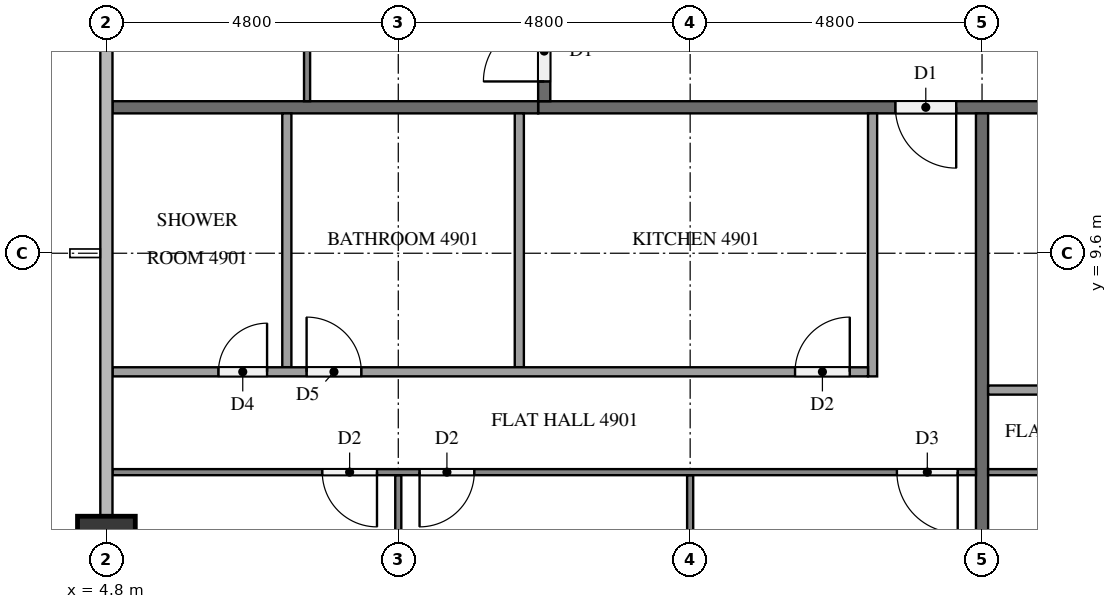
"""IFC4 building model, lengths in metres.
Left out: names, types, materials, properties, quantities, classifications, styles, units other than length and angle.
Written with IfcOpenShell. Run it as: python <this file> out.ifc"""

import sys

from ifc_helpers import new_model, si_unit, direction, frame, frame_2d, origin, origin_2d, place, context, subcontext, project, spatial, rectangle, extrude, element, fill, save


model = new_model("IFC4")
c1 = context("Model", 3, precision=1e-05, world=origin(), true_north=direction((0.0, 1.0)))
c2 = subcontext(c1, "Body", "Model", "MODEL_VIEW")
j1 = project(units=[si_unit("LENGTHUNIT", "METRE"), si_unit("PLANEANGLEUNIT", "RADIAN")], contexts=[c1])
p1 = place(None, origin())
s1 = spatial("IfcSite", under=j1, at=p1, CompositionType="ELEMENT")
p2 = place(p1, origin())
s2 = spatial("IfcBuilding", under=s1, at=p2, CompositionType="ELEMENT")
p3 = place(p2, frame((0.0, 0.0, 189.4)))
s3 = spatial("IfcBuildingStorey", under=s2, at=p3, CompositionType="ELEMENT", Elevation=189.4)
p4 = place(p3, frame((4.8, 4.8, 0.0), z_axis=(0.0, 0.0, 1.0), x_axis=(1.0, 0.0, 0.0)))
e1 = element("IfcColumn", 1, at=p4, inside=s3, PredefinedType="COLUMN", context=c2, shape_type="SweptSolid", body=[
    extrude(rectangle(XDim=0.95, YDim=0.95, at=origin_2d()), origin(), (0.0, 0.0, 1.0), 3.2),
])
p5 = place(p3, frame((50.5, 12.0, 0.0), z_axis=(0.0, 0.0, 1.0), x_axis=(-1.0, 0.0, 0.0)))
e2 = element("IfcWall", 2, at=p5, inside=s3, PredefinedType="PARTITIONING", context=c2, shape_type="SweptSolid", body=[
    extrude(rectangle(XDim=38.6, YDim=0.2, at=frame_2d((19.3, 0.0))), origin(), (0.0, 0.0, 1.0), 3.2),
])
p6 = place(p5, frame((31.725, 0.0, 0.0)))
e3 = element("IfcOpeningElement", 3, at=p6, cuts=e2, PredefinedType="OPENING", context=c2, shape_type="SweptSolid", body=[
    extrude(rectangle(XDim=1.0, YDim=2.1, at=frame_2d((0.5, 1.05))), frame((0.0, 0.11, 0.0), z_axis=(0.0, -1.0, 0.0), x_axis=(1.0, 0.0, 0.0)), (0.0, 0.0, 1.0), 0.22),
])
p7 = place(p5, frame((19.725, 0.0, 0.0)))
e4 = element("IfcOpeningElement", 4, at=p7, cuts=e2, PredefinedType="OPENING", context=c2, shape_type="SweptSolid", body=[
    extrude(rectangle(XDim=1.0, YDim=2.1, at=frame_2d((0.5, 1.05))), frame((0.0, 0.11, 0.0), z_axis=(0.0, -1.0, 0.0), x_axis=(1.0, 0.0, 0.0)), (0.0, 0.0, 1.0), 0.22),
])
p8 = place(p5, frame((17.875, 0.0, 0.0)))
e5 = element("IfcOpeningElement", 5, at=p8, cuts=e2, PredefinedType="OPENING", context=c2, shape_type="SweptSolid", body=[
    extrude(rectangle(XDim=1.0, YDim=2.1, at=frame_2d((0.5, 1.05))), frame((0.0, 0.11, 0.0), z_axis=(0.0, -1.0, 0.0), x_axis=(1.0, 0.0, 0.0)), (0.0, 0.0, 1.0), 0.22),
])
p9 = place(p5, frame((3.475, 0.0, 0.0)))
e6 = element("IfcOpeningElement", 6, at=p9, cuts=e2, PredefinedType="OPENING", context=c2, shape_type="SweptSolid", body=[
    extrude(rectangle(XDim=1.0, YDim=2.1, at=frame_2d((0.5, 1.05))), frame((0.0, 0.11, 0.0), z_axis=(0.0, -1.0, 0.0), x_axis=(1.0, 0.0, 0.0)), (0.0, 0.0, 1.0), 0.22),
])
p10 = place(p3, frame((12.0, 12.1, 0.0), z_axis=(0.0, 0.0, 1.0), x_axis=(0.0, 1.0, 0.0)))
e7 = element("IfcWall", 7, at=p10, inside=s3, PredefinedType="PARTITIONING", context=c2, shape_type="SweptSolid", body=[
    extrude(rectangle(XDim=28.6, YDim=0.2, at=frame_2d((14.3, 0.0))), origin(), (0.0, 0.0, 1.0), 3.2),
])
p11 = place(p10, frame((27.275, 0.0, 0.0)))
e8 = element("IfcOpeningElement", 8, at=p11, cuts=e7, PredefinedType="OPENING", context=c2, shape_type="SweptSolid", body=[
    extrude(rectangle(XDim=1.0, YDim=2.1, at=frame_2d((0.5, 1.05))), frame((0.0, 0.11, 0.0), z_axis=(0.0, -1.0, 0.0), x_axis=(1.0, 0.0, 0.0)), (0.0, 0.0, 1.0), 0.22),
])
p12 = place(p10, frame((0.325, 0.0, 0.0)))
e9 = element("IfcOpeningElement", 9, at=p12, cuts=e7, PredefinedType="OPENING", context=c2, shape_type="SweptSolid", body=[
    extrude(rectangle(XDim=1.0, YDim=2.1, at=frame_2d((0.5, 1.05))), frame((0.0, 0.11, 0.0), z_axis=(0.0, -1.0, 0.0), x_axis=(1.0, 0.0, 0.0)), (0.0, 0.0, 1.0), 0.22),
])
p13 = place(p3, frame((19.2, 11.9, 0.0), z_axis=(0.0, 0.0, 1.0), x_axis=(0.0, -1.0, 0.0)))
e10 = element("IfcWall", 10, at=p13, inside=s3, PredefinedType="PARTITIONING", context=c2, shape_type="SweptSolid", body=[
    extrude(rectangle(XDim=11.575, YDim=0.2, at=frame_2d((5.788, 0.0))), origin(), (0.0, 0.0, 1.0), 3.2),
])
p14 = place(p3, frame((4.9, 12.0, 0.0), z_axis=(0.0, 0.0, 1.0), x_axis=(1.0, 0.0, 0.0)))
e11 = element("IfcWall", 11, at=p14, inside=s3, PredefinedType="PARTITIONING", context=c2, shape_type="SweptSolid", body=[
    extrude(rectangle(XDim=7.0, YDim=0.2, at=frame_2d((3.5, 0.0))), origin(), (0.0, 0.0, 1.0), 3.2),
])
p15 = place(p3, frame((14.4, 5.95, 0.0), z_axis=(0.0, 0.0, 1.0), x_axis=(0.0, -1.0, 0.0)))
e12 = element("IfcWall", 12, at=p15, inside=s3, PredefinedType="PARTITIONING", context=c2, shape_type="SweptSolid", body=[
    extrude(rectangle(XDim=5.85, YDim=0.1, at=frame_2d((2.925, 0.0))), origin(), (0.0, 0.0, 1.0), 3.2),
])
p16 = place(p3, frame((9.6, 5.95, 0.0), z_axis=(0.0, 0.0, 1.0), x_axis=(0.0, -1.0, 0.0)))
e13 = element("IfcWall", 13, at=p16, inside=s3, PredefinedType="PARTITIONING", context=c2, shape_type="SweptSolid", body=[
    extrude(rectangle(XDim=5.475, YDim=0.1, at=frame_2d((2.737, 0.0))), origin(), (0.0, 0.0, 1.0), 3.2),
])
p17 = place(p3, frame((19.1, 6.0, 0.0), z_axis=(0.0, 0.0, 1.0), x_axis=(-1.0, 0.0, 0.0)))
e14 = element("IfcWall", 14, at=p17, inside=s3, PredefinedType="PARTITIONING", context=c2, shape_type="SweptSolid", body=[
    extrude(rectangle(XDim=14.2, YDim=0.1, at=frame_2d((7.1, 0.0))), origin(), (0.0, 0.0, 1.0), 3.2),
])
p18 = place(p17, frame((0.3, 0.0, 0.0)))
e15 = element("IfcOpeningElement", 15, at=p18, cuts=e14, PredefinedType="OPENING", context=c2, shape_type="SweptSolid", body=[
    extrude(rectangle(XDim=1.0, YDim=2.1, at=frame_2d((0.5, 1.05))), frame((0.0, 0.06, 0.0), z_axis=(0.0, -1.0, 0.0), x_axis=(1.0, 0.0, 0.0)), (0.0, 0.0, 1.0), 0.12),
])
p19 = place(p17, frame((8.25, 0.0, 0.0)))
e16 = element("IfcOpeningElement", 16, at=p19, cuts=e14, PredefinedType="OPENING", context=c2, shape_type="SweptSolid", body=[
    extrude(rectangle(XDim=0.9, YDim=2.1, at=frame_2d((0.45, 1.05))), frame((0.0, 0.06, 0.0), z_axis=(0.0, -1.0, 0.0), x_axis=(1.0, 0.0, 0.0)), (0.0, 0.0, 1.0), 0.12),
])
p20 = place(p17, frame((9.85, 0.0, 0.0)))
e17 = element("IfcOpeningElement", 17, at=p20, cuts=e14, PredefinedType="OPENING", context=c2, shape_type="SweptSolid", body=[
    extrude(rectangle(XDim=0.9, YDim=2.1, at=frame_2d((0.45, 1.05))), frame((0.0, 0.06, 0.0), z_axis=(0.0, -1.0, 0.0), x_axis=(1.0, 0.0, 0.0)), (0.0, 0.0, 1.0), 0.12),
])
for number, where, z_axis, x_axis in (
    (18, (11.59, 11.9, 0.0), (0.0, 0.0, 1.0), (0.0, -1.0, 0.0)),
    (19, (7.767, 11.9, 0.0), (0.0, 0.0, 1.0), (0.0, -1.0, 0.0)),
):
    element("IfcWall", number, at=place(p3, frame(where, z_axis=z_axis, x_axis=x_axis)), inside=s3, PredefinedType="PARTITIONING", context=c2, shape_type="SweptSolid", body=[
        extrude(rectangle(XDim=4.175, YDim=0.15, at=frame_2d((2.087, 0.0))), origin(), (0.0, 0.0, 1.0), 3.2),
    ])
p21 = place(p3, frame((17.4, 11.9, 0.0), z_axis=(0.0, 0.0, 1.0), x_axis=(0.0, -1.0, 0.0)))
e20 = element("IfcWall", 20, at=p21, inside=s3, PredefinedType="PARTITIONING", context=c2, shape_type="SweptSolid", body=[
    extrude(rectangle(XDim=4.325, YDim=0.15, at=frame_2d((2.163, 0.0))), origin(), (0.0, 0.0, 1.0), 3.2),
])
p22 = place(p3, frame((4.9, 7.65, 0.0), z_axis=(0.0, 0.0, 1.0), x_axis=(1.0, 0.0, 0.0)))
e21 = element("IfcWall", 21, at=p22, inside=s3, PredefinedType="PARTITIONING", context=c2, shape_type="SweptSolid", body=[
    extrude(rectangle(XDim=12.425, YDim=0.15, at=frame_2d((6.212, 0.0))), origin(), (0.0, 0.0, 1.0), 3.2),
])
p23 = place(p22, frame((11.225, 0.0, 0.0)))
e22 = element("IfcOpeningElement", 22, at=p23, cuts=e21, PredefinedType="OPENING", context=c2, shape_type="SweptSolid", body=[
    extrude(rectangle(XDim=0.9, YDim=2.1, at=frame_2d((0.45, 1.05))), frame((0.0, 0.085, 0.0), z_axis=(0.0, -1.0, 0.0), x_axis=(1.0, 0.0, 0.0)), (0.0, 0.0, 1.0), 0.17),
])
p24 = place(p22, frame((3.192, 0.0, 0.0)))
e23 = element("IfcOpeningElement", 23, at=p24, cuts=e21, PredefinedType="OPENING", context=c2, shape_type="SweptSolid", body=[
    extrude(rectangle(XDim=0.9, YDim=2.1, at=frame_2d((0.45, 1.05))), frame((0.0, 0.085, 0.0), z_axis=(0.0, -1.0, 0.0), x_axis=(1.0, 0.0, 0.0)), (0.0, 0.0, 1.0), 0.17),
])
p25 = place(p22, frame((1.742, 0.0, 0.0)))
e24 = element("IfcOpeningElement", 24, at=p25, cuts=e21, PredefinedType="OPENING", context=c2, shape_type="SweptSolid", body=[
    extrude(rectangle(XDim=0.8, YDim=2.1, at=frame_2d((0.4, 1.05))), frame((0.0, 0.085, 0.0), z_axis=(0.0, -1.0, 0.0), x_axis=(1.0, 0.0, 0.0)), (0.0, 0.0, 1.0), 0.17),
])
p26 = place(p3, frame((31.1, 6.0, 0.0), z_axis=(0.0, 0.0, 1.0), x_axis=(-1.0, 0.0, 0.0)))
e25 = element("IfcWall", 25, at=p26, inside=s3, PredefinedType="PARTITIONING", context=c2, shape_type="SweptSolid", body=[
    extrude(rectangle(XDim=11.8, YDim=0.1, at=frame_2d((5.9, 0.0))), origin(), (0.0, 0.0, 1.0), 3.2),
])
p27 = place(p26, frame((5.75, 0.0, 0.0)))
e26 = element("IfcOpeningElement", 26, at=p27, cuts=e25, PredefinedType="OPENING", context=c2, shape_type="SweptSolid", body=[
    extrude(rectangle(XDim=1.0, YDim=2.1, at=frame_2d((0.5, 1.05))), frame((0.0, 0.06, 0.0), z_axis=(0.0, -1.0, 0.0), x_axis=(1.0, 0.0, 0.0)), (0.0, 0.0, 1.0), 0.12),
])
p28 = place(p26, frame((7.45, 0.0, 0.0)))
e27 = element("IfcOpeningElement", 27, at=p28, cuts=e25, PredefinedType="OPENING", context=c2, shape_type="SweptSolid", body=[
    extrude(rectangle(XDim=0.9, YDim=2.1, at=frame_2d((0.45, 1.05))), frame((0.0, 0.06, 0.0), z_axis=(0.0, -1.0, 0.0), x_axis=(1.0, 0.0, 0.0)), (0.0, 0.0, 1.0), 0.12),
])
p29 = place(p3, frame((19.3, 7.35, 0.0), z_axis=(0.0, 0.0, 1.0), x_axis=(1.0, 0.0, 0.0)))
e28 = element("IfcWall", 28, at=p29, inside=s3, PredefinedType="PARTITIONING", context=c2, shape_type="SweptSolid", body=[
    extrude(rectangle(XDim=10.025, YDim=0.15, at=frame_2d((5.012, 0.0))), origin(), (0.0, 0.0, 1.0), 3.2),
])
p30 = place(p29, frame((6.34, 0.0, 0.0)))
e29 = element("IfcOpeningElement", 29, at=p30, cuts=e28, PredefinedType="OPENING", context=c2, shape_type="SweptSolid", body=[
    extrude(rectangle(XDim=0.8, YDim=2.1, at=frame_2d((0.4, 1.05))), frame((0.0, 0.085, 0.0), z_axis=(0.0, -1.0, 0.0), x_axis=(1.0, 0.0, 0.0)), (0.0, 0.0, 1.0), 0.17),
])
p31 = place(p29, frame((4.79, 0.0, 0.0)))
e30 = element("IfcOpeningElement", 30, at=p31, cuts=e28, PredefinedType="OPENING", context=c2, shape_type="SweptSolid", body=[
    extrude(rectangle(XDim=0.9, YDim=2.1, at=frame_2d((0.45, 1.05))), frame((0.0, 0.085, 0.0), z_axis=(0.0, -1.0, 0.0), x_axis=(1.0, 0.0, 0.0)), (0.0, 0.0, 1.0), 0.17),
])
p32 = place(p3, frame((8.1, 12.1, 0.0), z_axis=(0.0, 0.0, 1.0), x_axis=(0.0, 1.0, 0.0)))
e31 = element("IfcWall", 31, at=p32, inside=s3, PredefinedType="PARTITIONING", context=c2, shape_type="SweptSolid", body=[
    extrude(rectangle(XDim=14.2, YDim=0.1, at=frame_2d((7.1, 0.0))), origin(), (0.0, 0.0, 1.0), 3.2),
])
p33 = place(p32, frame((3.45, 0.0, 0.0)))
e32 = element("IfcOpeningElement", 32, at=p33, cuts=e31, PredefinedType="OPENING", context=c2, shape_type="SweptSolid", body=[
    extrude(rectangle(XDim=0.9, YDim=2.1, at=frame_2d((0.45, 1.05))), frame((0.0, 0.06, 0.0), z_axis=(0.0, -1.0, 0.0), x_axis=(1.0, 0.0, 0.0)), (0.0, 0.0, 1.0), 0.12),
])
p34 = place(p32, frame((5.05, 0.0, 0.0)))
e33 = element("IfcOpeningElement", 33, at=p34, cuts=e31, PredefinedType="OPENING", context=c2, shape_type="SweptSolid", body=[
    extrude(rectangle(XDim=1.0, YDim=2.1, at=frame_2d((0.5, 1.05))), frame((0.0, 0.06, 0.0), z_axis=(0.0, -1.0, 0.0), x_axis=(1.0, 0.0, 0.0)), (0.0, 0.0, 1.0), 0.12),
])
p35 = place(p32, frame((13.0, 0.0, 0.0)))
e34 = element("IfcOpeningElement", 34, at=p35, cuts=e31, PredefinedType="OPENING", context=c2, shape_type="SweptSolid", body=[
    extrude(rectangle(XDim=0.9, YDim=2.1, at=frame_2d((0.45, 1.05))), frame((0.0, 0.06, 0.0), z_axis=(0.0, -1.0, 0.0), x_axis=(1.0, 0.0, 0.0)), (0.0, 0.0, 1.0), 0.12),
])
p36 = place(p6, origin())
e35 = element("IfcDoor", 35, at=p36, inside=s3, OperationType="SINGLE_SWING_LEFT", PredefinedType="DOOR", context=c2, shape_type="SweptSolid", body=[
    extrude(rectangle(XDim=1.0, YDim=2.1, at=frame_2d((0.5, 1.05))), frame((0.0, 0.025, 0.0), z_axis=(0.0, -1.0, 0.0), x_axis=(1.0, 0.0, 0.0)), (0.0, 0.0, 1.0), 0.05),
])
fill(e3, e35)
p37 = place(p12, origin())
e36 = element("IfcDoor", 36, at=p37, inside=s3, OperationType="SINGLE_SWING_LEFT", PredefinedType="DOOR", context=c2, shape_type="SweptSolid", body=[
    extrude(rectangle(XDim=1.0, YDim=2.1, at=frame_2d((0.5, 1.05))), frame((0.0, 0.025, 0.0), z_axis=(0.0, -1.0, 0.0), x_axis=(1.0, 0.0, 0.0)), (0.0, 0.0, 1.0), 0.05),
])
fill(e9, e36)
p38 = place(p18, origin())
e37 = element("IfcDoor", 37, at=p38, inside=s3, OperationType="SINGLE_SWING_LEFT", PredefinedType="DOOR", context=c2, shape_type="SweptSolid", body=[
    extrude(rectangle(XDim=1.0, YDim=2.1, at=frame_2d((0.5, 1.05))), frame((0.0, 0.025, 0.0), z_axis=(0.0, -1.0, 0.0), x_axis=(1.0, 0.0, 0.0)), (0.0, 0.0, 1.0), 0.05),
])
fill(e15, e37)
p39 = place(p19, origin())
e38 = element("IfcDoor", 38, at=p39, inside=s3, OperationType="SINGLE_SWING_RIGHT", PredefinedType="DOOR", context=c2, shape_type="SweptSolid", body=[
    extrude(rectangle(XDim=0.9, YDim=2.1, at=frame_2d((0.45, 1.05))), frame((0.0, 0.025, 0.0), z_axis=(0.0, -1.0, 0.0), x_axis=(1.0, 0.0, 0.0)), (0.0, 0.0, 1.0), 0.05),
])
fill(e16, e38)
p40 = place(p20, origin())
e39 = element("IfcDoor", 39, at=p40, inside=s3, OperationType="SINGLE_SWING_LEFT", PredefinedType="DOOR", context=c2, shape_type="SweptSolid", body=[
    extrude(rectangle(XDim=0.9, YDim=2.1, at=frame_2d((0.45, 1.05))), frame((0.0, 0.025, 0.0), z_axis=(0.0, -1.0, 0.0), x_axis=(1.0, 0.0, 0.0)), (0.0, 0.0, 1.0), 0.05),
])
fill(e17, e39)
p41 = place(p23, origin())
e40 = element("IfcDoor", 40, at=p41, inside=s3, OperationType="SINGLE_SWING_RIGHT", PredefinedType="DOOR", context=c2, shape_type="SweptSolid", body=[
    extrude(rectangle(XDim=0.9, YDim=2.1, at=frame_2d((0.45, 1.05))), frame((0.0, 0.025, 0.0), z_axis=(0.0, -1.0, 0.0), x_axis=(1.0, 0.0, 0.0)), (0.0, 0.0, 1.0), 0.05),
])
fill(e22, e40)
p42 = place(p24, origin())
e41 = element("IfcDoor", 41, at=p42, inside=s3, OperationType="SINGLE_SWING_LEFT", PredefinedType="DOOR", context=c2, shape_type="SweptSolid", body=[
    extrude(rectangle(XDim=0.9, YDim=2.1, at=frame_2d((0.45, 1.05))), frame((0.0, 0.025, 0.0), z_axis=(0.0, -1.0, 0.0), x_axis=(1.0, 0.0, 0.0)), (0.0, 0.0, 1.0), 0.05),
])
fill(e23, e41)
p43 = place(p25, origin())
e42 = element("IfcDoor", 42, at=p43, inside=s3, OperationType="SINGLE_SWING_RIGHT", PredefinedType="DOOR", context=c2, shape_type="SweptSolid", body=[
    extrude(rectangle(XDim=0.8, YDim=2.1, at=frame_2d((0.4, 1.05))), frame((0.0, 0.025, 0.0), z_axis=(0.0, -1.0, 0.0), x_axis=(1.0, 0.0, 0.0)), (0.0, 0.0, 1.0), 0.05),
])
fill(e24, e42)
save(model, sys.argv[1])
